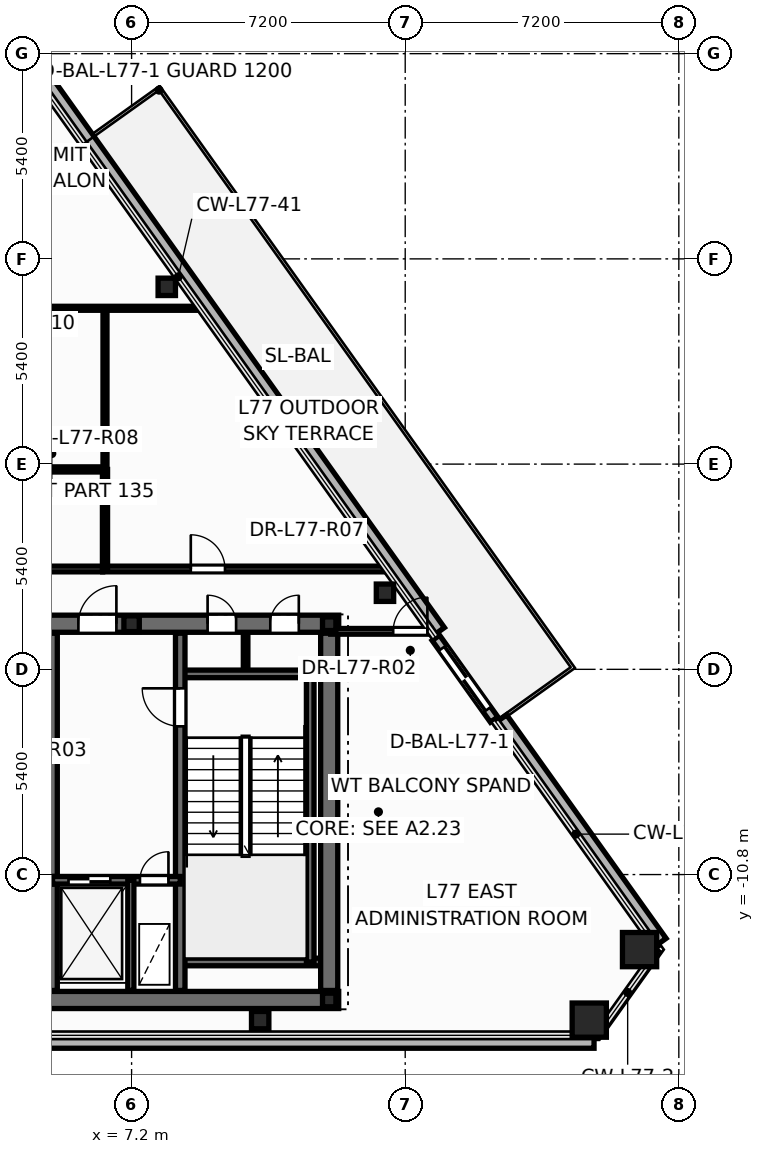
"""IFC4 building model, lengths in metres.
Left out: names, types, materials, properties, quantities, classifications, styles, units other than length and angle.
Written with IfcOpenShell. Run it as: python <this file> out.ifc"""

import sys

from ifc_helpers import new_model, si_unit, direction, frame, frame_2d, origin, origin_2d, place, context, subcontext, project, spatial, rectangle, hollow_rectangle, hollow_circle, i_section, extrude, element, fill, save


model = new_model("IFC4")
c1 = context("Model", 3, precision=1e-05, world=origin(), true_north=direction((0.0, 1.0)))
c2 = subcontext(c1, "Body", "Model", "MODEL_VIEW")
j1 = project(units=[si_unit("LENGTHUNIT", "METRE"), si_unit("PLANEANGLEUNIT", "RADIAN")], contexts=[c1])
p1 = place(None, origin())
s1 = spatial("IfcSite", under=j1, at=p1, CompositionType="ELEMENT")
p2 = place(p1, origin())
s2 = spatial("IfcBuilding", under=s1, at=p2, CompositionType="ELEMENT")
p3 = place(p2, frame((0.0, 0.0, 293.4)))
s3 = spatial("IfcBuildingStorey", under=s2, at=p3, CompositionType="ELEMENT", Elevation=293.4)
for number, where, z_axis, x_axis in (
    (1, (19.243, -14.63, 0.0), (0.0, 0.0, 1.0), (1.0, 0.0, 0.0)),
    (2, (20.567, -12.775, 0.0), (0.0, 0.0, 1.0), (1.0, 0.0, 0.0)),
):
    element("IfcColumn", number, at=place(p3, frame(where, z_axis=z_axis, x_axis=x_axis)), inside=s3, PredefinedType="COLUMN", context=c2, shape_type="SweptSolid", body=[
        extrude(hollow_rectangle(XDim=0.9, YDim=0.9, WallThickness=0.04, at=origin_2d()), origin(), (0.0, 0.0, 1.0), 4.2),
    ])
for number, where, z_axis, x_axis in (
    (3, (10.583, -14.63, 0.0), (0.0, 0.0, 1.0), (1.0, 0.0, 0.0)),
    (4, (13.868, -3.385, 0.0), (0.0, 0.0, 1.0), (1.0, 0.0, 0.0)),
    (5, (8.126, 4.664, 0.0), (0.0, 0.0, 1.0), (1.0, 0.0, 0.0)),
):
    element("IfcColumn", number, at=place(p3, frame(where, z_axis=z_axis, x_axis=x_axis)), inside=s3, PredefinedType="COLUMN", context=c2, shape_type="SweptSolid", body=[
        extrude(hollow_circle(Radius=0.229, WallThickness=0.016, at=origin_2d()), origin(), (0.0, 0.0, 1.0), 4.2),
    ])
for number, where, z_axis, x_axis in (
    (6, (12.4, -14.1, 0.0), (0.0, 0.0, 1.0), (1.0, 0.0, 0.0)),
    (7, (12.4, -4.2, 0.0), (0.0, 0.0, 1.0), (1.0, 0.0, 0.0)),
):
    element("IfcColumn", number, at=place(p3, frame(where, z_axis=z_axis, x_axis=x_axis)), inside=s3, PredefinedType="COLUMN", context=c2, shape_type="SweptSolid", body=[
        extrude(i_section(OverallWidth=0.352, OverallDepth=0.359, WebThickness=0.018, FlangeThickness=0.026, at=origin_2d()), origin(), (0.0, 0.0, 1.0), 4.2),
    ])
p4 = place(p3, frame((7.2, -4.2, 0.0), z_axis=(0.0, 0.0, 1.0), x_axis=(1.0, 0.0, 0.0)))
e8 = element("IfcColumn", 8, at=p4, inside=s3, PredefinedType="PILASTER", context=c2, shape_type="SweptSolid", body=[
    extrude(i_section(OverallWidth=0.405, OverallDepth=0.414, WebThickness=0.022, FlangeThickness=0.032, at=origin_2d()), origin(), (0.0, 0.0, 1.0), 4.2),
])
p5 = place(p3, frame((-19.369, -15.19, -0.2), z_axis=(0.0, 0.0, 1.0), x_axis=(1.0, 0.0, 0.0)))
e9 = element("IfcWall", 9, at=p5, inside=s3, PredefinedType="PARAPET", context=c2, shape_type="SweptSolid", body=[
    extrude(rectangle(XDim=38.738, YDim=0.36, at=frame_2d((19.369, 0.0))), origin(), (0.0, 0.0, 1.0), 0.38),
])
p6 = place(p3, frame((21.119, -12.584, -0.2), z_axis=(0.0, 0.0, 1.0), x_axis=(-0.580761854771, 0.81407350285, 0.0)))
e10 = element("IfcWall", 10, at=p6, inside=s3, PredefinedType="PARAPET", context=c2, shape_type="SweptSolid", body=[
    extrude(rectangle(XDim=7.226, YDim=0.36, at=frame_2d((3.613, 0.0))), origin(), (0.0, 0.0, 1.0), 0.38),
])
p7 = place(p3, frame((15.285, -4.406, -0.2), z_axis=(0.0, 0.0, 1.0), x_axis=(-0.580762496963, 0.814073044709, 0.0)))
e11 = element("IfcWall", 11, at=p7, inside=s3, PredefinedType="PARAPET", context=c2, shape_type="SweptSolid", body=[
    extrude(rectangle(XDim=23.163, YDim=0.36, at=frame_2d((11.581, 0.0))), origin(), (0.0, 0.0, 1.0), 0.38),
])
p8 = place(p3, frame((16.74, -6.722, -0.015), z_axis=(0.0, 0.0, 1.0), x_axis=(-0.580756960622, 0.814076994325, 0.0)))
e12 = element("IfcWall", 12, at=p8, inside=s3, PredefinedType="STANDARD", context=c2, shape_type="SweptSolid", body=[
    extrude(rectangle(XDim=2.64, YDim=0.24, at=frame_2d((1.32, 0.0))), origin(), (0.0, 0.0, 1.0), 3.413),
])
p9 = place(p8, frame((0.32, 0.0, 0.015)))
e13 = element("IfcOpeningElement", 13, at=p9, cuts=e12, PredefinedType="OPENING", context=c2, shape_type="SweptSolid", body=[
    extrude(rectangle(XDim=2.006, YDim=2.204, at=frame_2d((1.0, 1.102))), frame((0.0, 0.13, 0.0), z_axis=(0.0, -1.0, 0.0), x_axis=(1.0, 0.0, 0.0)), (0.0, 0.0, 1.0), 0.26),
])
p10 = place(p3, frame((2.06, -9.45, 0.0), z_axis=(0.0, 0.0, 1.0), x_axis=(1.0, 0.0, 0.0)))
e14 = element("IfcWall", 14, at=p10, inside=s3, PredefinedType="PARTITIONING", context=c2, shape_type="SweptSolid", body=[
    extrude(rectangle(XDim=3.06, YDim=0.15, at=frame_2d((1.53, 0.0))), origin(), (0.0, 0.0, 1.0), 3.88),
])
p11 = place(p3, frame((10.2, -5.52, 0.0), z_axis=(0.0, 0.0, 1.0), x_axis=(0.0, 1.0, 0.0)))
e15 = element("IfcWall", 15, at=p11, inside=s3, PredefinedType="PARTITIONING", context=c2, shape_type="SweptSolid", body=[
    extrude(rectangle(XDim=1.12, YDim=0.12, at=frame_2d((0.56, 0.0))), origin(), (0.0, 0.0, 1.0), 3.88),
])
p12 = place(p3, frame((-12.65, -14.1, 0.0), z_axis=(0.0, 0.0, 1.0), x_axis=(1.0, 0.0, 0.0)))
e16 = element("IfcWall", 16, at=p12, inside=s3, PredefinedType="SHEAR", context=c2, shape_type="SweptSolid", body=[
    extrude(rectangle(XDim=25.3, YDim=0.45, at=frame_2d((12.65, 0.0))), origin(), (0.0, 0.0, 1.0), 4.2),
])
p13 = place(p3, frame((-12.65, -4.2, 0.0), z_axis=(0.0, 0.0, 1.0), x_axis=(1.0, 0.0, 0.0)))
e17 = element("IfcWall", 17, at=p13, inside=s3, PredefinedType="SHEAR", context=c2, shape_type="SweptSolid", body=[
    extrude(rectangle(XDim=25.3, YDim=0.45, at=frame_2d((12.65, 0.0))), origin(), (0.0, 0.0, 1.0), 4.2),
])
p14 = place(p13, frame((0.95, 0.0, 0.0)))
e18 = element("IfcOpeningElement", 18, at=p14, cuts=e17, PredefinedType="OPENING", context=c2, shape_type="SweptSolid", body=[
    extrude(rectangle(XDim=0.756, YDim=2.054, at=frame_2d((0.375, 1.027))), frame((0.0, 0.235, 0.0), z_axis=(0.0, -1.0, 0.0), x_axis=(1.0, 0.0, 0.0)), (0.0, 0.0, 1.0), 0.47),
])
p15 = place(p13, frame((2.6, 0.0, 0.0)))
e19 = element("IfcOpeningElement", 19, at=p15, cuts=e17, PredefinedType="OPENING", context=c2, shape_type="SweptSolid", body=[
    extrude(rectangle(XDim=0.756, YDim=2.054, at=frame_2d((0.375, 1.027))), frame((0.0, 0.235, 0.0), z_axis=(0.0, -1.0, 0.0), x_axis=(1.0, 0.0, 0.0)), (0.0, 0.0, 1.0), 0.47),
])
p16 = place(p13, frame((21.85, 0.0, 0.0)))
e20 = element("IfcOpeningElement", 20, at=p16, cuts=e17, PredefinedType="OPENING", context=c2, shape_type="SweptSolid", body=[
    extrude(rectangle(XDim=0.756, YDim=2.054, at=frame_2d((0.375, 1.027))), frame((0.0, 0.235, 0.0), z_axis=(0.0, -1.0, 0.0), x_axis=(1.0, 0.0, 0.0)), (0.0, 0.0, 1.0), 0.47),
])
p17 = place(p13, frame((23.5, 0.0, 0.0)))
e21 = element("IfcOpeningElement", 21, at=p17, cuts=e17, PredefinedType="OPENING", context=c2, shape_type="SweptSolid", body=[
    extrude(rectangle(XDim=0.756, YDim=2.054, at=frame_2d((0.375, 1.027))), frame((0.0, 0.235, 0.0), z_axis=(0.0, -1.0, 0.0), x_axis=(1.0, 0.0, 0.0)), (0.0, 0.0, 1.0), 0.47),
])
p18 = place(p13, frame((5.85, 0.0, 0.0)))
e22 = element("IfcOpeningElement", 22, at=p18, cuts=e17, PredefinedType="OPENING", context=c2, shape_type="SweptSolid", body=[
    extrude(rectangle(XDim=1.006, YDim=2.104, at=frame_2d((0.5, 1.052))), frame((0.0, 0.235, 0.0), z_axis=(0.0, -1.0, 0.0), x_axis=(1.0, 0.0, 0.0)), (0.0, 0.0, 1.0), 0.47),
])
p19 = place(p13, frame((10.35, 0.0, 0.0)))
e23 = element("IfcOpeningElement", 23, at=p19, cuts=e17, PredefinedType="OPENING", context=c2, shape_type="SweptSolid", body=[
    extrude(rectangle(XDim=1.406, YDim=2.154, at=frame_2d((0.7, 1.077))), frame((0.0, 0.235, 0.0), z_axis=(0.0, -1.0, 0.0), x_axis=(1.0, 0.0, 0.0)), (0.0, 0.0, 1.0), 0.47),
])
p20 = place(p13, frame((18.45, 0.0, 0.0)))
e24 = element("IfcOpeningElement", 24, at=p20, cuts=e17, PredefinedType="OPENING", context=c2, shape_type="SweptSolid", body=[
    extrude(rectangle(XDim=1.006, YDim=2.104, at=frame_2d((0.5, 1.052))), frame((0.0, 0.235, 0.0), z_axis=(0.0, -1.0, 0.0), x_axis=(1.0, 0.0, 0.0)), (0.0, 0.0, 1.0), 0.47),
])
for number, where, z_axis, x_axis in (
    (25, (8.48, -5.52, 0.0), (0.0, 0.0, 1.0), (1.0, 0.0, 0.0)),
    (26, (8.48, -13.1, 0.0), (0.0, 0.0, 1.0), (1.0, 0.0, 0.0)),
):
    element("IfcWall", number, at=place(p3, frame(where, z_axis=z_axis, x_axis=x_axis)), inside=s3, PredefinedType="SOLIDWALL", context=c2, shape_type="SweptSolid", body=[
        extrude(rectangle(XDim=3.87, YDim=0.2, at=frame_2d((1.935, 0.0))), origin(), (0.0, 0.0, 1.0), 4.2),
    ])
p21 = place(p3, frame((11.9, -13.1, 0.0), z_axis=(0.0, 0.0, 1.0), x_axis=(0.0, 1.0, 0.0)))
e27 = element("IfcWall", 27, at=p21, inside=s3, PredefinedType="SOLIDWALL", context=c2, shape_type="SweptSolid", body=[
    extrude(rectangle(XDim=7.58, YDim=0.2, at=frame_2d((3.79, 0.0))), origin(), (0.0, 0.0, 1.0), 4.2),
])
p22 = place(p3, frame((8.48, -13.85, 0.0), z_axis=(0.0, 0.0, 1.0), x_axis=(0.0, 1.0, 0.0)))
e28 = element("IfcWall", 28, at=p22, inside=s3, PredefinedType="SHEAR", context=c2, shape_type="SweptSolid", body=[
    extrude(rectangle(XDim=9.4, YDim=0.25, at=frame_2d((4.7, 0.0))), origin(), (0.0, 0.0, 1.0), 4.2),
])
p23 = place(p22, frame((6.95, 0.0, 0.0)))
e29 = element("IfcOpeningElement", 29, at=p23, cuts=e28, PredefinedType="OPENING", context=c2, shape_type="SweptSolid", body=[
    extrude(rectangle(XDim=1.006, YDim=2.104, at=frame_2d((0.5, 1.052))), frame((0.0, 0.135, 0.0), z_axis=(0.0, -1.0, 0.0), x_axis=(1.0, 0.0, 0.0)), (0.0, 0.0, 1.0), 0.27),
])
p24 = place(p3, frame((5.12, -13.85, 0.0), z_axis=(0.0, 0.0, 1.0), x_axis=(0.0, 1.0, 0.0)))
e30 = element("IfcWall", 30, at=p24, inside=s3, PredefinedType="SHEAR", context=c2, shape_type="SweptSolid", body=[
    extrude(rectangle(XDim=9.4, YDim=0.25, at=frame_2d((4.7, 0.0))), origin(), (0.0, 0.0, 1.0), 4.2),
])
p25 = place(p3, frame((-5.12, -10.95, 0.0), z_axis=(0.0, 0.0, 1.0), x_axis=(1.0, 0.0, 0.0)))
e31 = element("IfcWall", 31, at=p25, inside=s3, PredefinedType="SOLIDWALL", context=c2, shape_type="SweptSolid", body=[
    extrude(rectangle(XDim=10.24, YDim=0.2, at=frame_2d((5.12, 0.0))), origin(), (0.0, 0.0, 1.0), 4.2),
])
p26 = place(p25, frame((0.6, 0.0, 0.0)))
e32 = element("IfcOpeningElement", 32, at=p26, cuts=e31, PredefinedType="OPENING", context=c2, shape_type="SweptSolid", body=[
    extrude(rectangle(XDim=1.106, YDim=2.104, at=frame_2d((0.55, 1.052))), frame((0.0, 0.11, 0.0), z_axis=(0.0, -1.0, 0.0), x_axis=(1.0, 0.0, 0.0)), (0.0, 0.0, 1.0), 0.22),
])
p27 = place(p25, frame((4.65, 0.0, 0.0)))
e33 = element("IfcOpeningElement", 33, at=p27, cuts=e31, PredefinedType="OPENING", context=c2, shape_type="SweptSolid", body=[
    extrude(rectangle(XDim=0.956, YDim=2.104, at=frame_2d((0.475, 1.052))), frame((0.0, 0.11, 0.0), z_axis=(0.0, -1.0, 0.0), x_axis=(1.0, 0.0, 0.0)), (0.0, 0.0, 1.0), 0.22),
])
p28 = place(p25, frame((8.54, 0.0, 0.0)))
e34 = element("IfcOpeningElement", 34, at=p28, cuts=e31, PredefinedType="OPENING", context=c2, shape_type="SweptSolid", body=[
    extrude(rectangle(XDim=1.106, YDim=2.104, at=frame_2d((0.55, 1.052))), frame((0.0, 0.11, 0.0), z_axis=(0.0, -1.0, 0.0), x_axis=(1.0, 0.0, 0.0)), (0.0, 0.0, 1.0), 0.22),
])
p29 = place(p3, frame((5.12, -10.95, 0.0), z_axis=(0.0, 0.0, 1.0), x_axis=(1.0, 0.0, 0.0)))
e35 = element("IfcWall", 35, at=p29, inside=s3, PredefinedType="SOLIDWALL", context=c2, shape_type="SweptSolid", body=[
    extrude(rectangle(XDim=3.36, YDim=0.2, at=frame_2d((1.68, 0.0))), origin(), (0.0, 0.0, 1.0), 4.2),
])
p30 = place(p29, frame((0.42, 0.0, 0.0)))
e36 = element("IfcOpeningElement", 36, at=p30, cuts=e35, PredefinedType="OPENING", context=c2, shape_type="SweptSolid", body=[
    extrude(rectangle(XDim=1.106, YDim=2.104, at=frame_2d((0.55, 1.052))), frame((0.0, 0.11, 0.0), z_axis=(0.0, -1.0, 0.0), x_axis=(1.0, 0.0, 0.0)), (0.0, 0.0, 1.0), 0.22),
])
p31 = place(p29, frame((2.3, 0.0, 0.0)))
e37 = element("IfcOpeningElement", 37, at=p31, cuts=e35, PredefinedType="OPENING", context=c2, shape_type="SweptSolid", body=[
    extrude(rectangle(XDim=0.756, YDim=2.054, at=frame_2d((0.375, 1.027))), frame((0.0, 0.11, 0.0), z_axis=(0.0, -1.0, 0.0), x_axis=(1.0, 0.0, 0.0)), (0.0, 0.0, 1.0), 0.22),
])
p32 = place(p3, frame((7.18, -13.85, 0.0), z_axis=(0.0, 0.0, 1.0), x_axis=(0.0, 1.0, 0.0)))
e38 = element("IfcWall", 38, at=p32, inside=s3, PredefinedType="PARTITIONING", context=c2, shape_type="SweptSolid", body=[
    extrude(rectangle(XDim=2.9, YDim=0.16, at=frame_2d((1.45, 0.0))), origin(), (0.0, 0.0, 1.0), 3.105),
])
p33 = place(p3, frame((12.4, -13.85, 0.0), z_axis=(0.0, 0.0, 1.0), x_axis=(0.0, 1.0, 0.0)))
e39 = element("IfcWall", 39, at=p33, inside=s3, PredefinedType="SHEAR", context=c2, shape_type="SweptSolid", body=[
    extrude(rectangle(XDim=9.4, YDim=0.45, at=frame_2d((4.7, 0.0))), origin(), (0.0, 0.0, 1.0), 4.2),
])
p34 = place(p3, frame((6.44, -2.76, 0.0), z_axis=(0.0, 0.0, 1.0), x_axis=(1.0, 0.0, 0.0)))
e40 = element("IfcWall", 40, at=p34, inside=s3, PredefinedType="PARTITIONING", context=c2, shape_type="SweptSolid", body=[
    extrude(rectangle(XDim=7.474, YDim=0.15, at=frame_2d((3.737, 0.0))), origin(), (0.0, 0.0, 1.0), 2.855),
])
p35 = place(p34, frame((2.318, 0.0, 0.0)))
e41 = element("IfcOpeningElement", 41, at=p35, cuts=e40, PredefinedType="OPENING", context=c2, shape_type="SweptSolid", body=[
    extrude(rectangle(XDim=0.906, YDim=2.104, at=frame_2d((0.45, 1.052))), frame((0.0, 0.085, 0.0), z_axis=(0.0, -1.0, 0.0), x_axis=(1.0, 0.0, 0.0)), (0.0, 0.0, 1.0), 0.17),
])
p36 = place(p3, frame((6.5, -0.2, 0.0), z_axis=(0.0, 0.0, 1.0), x_axis=(0.0, 1.0, 0.0)))
e42 = element("IfcWall", 42, at=p36, inside=s3, PredefinedType="PARTITIONING", context=c2, shape_type="SweptSolid", body=[
    extrude(rectangle(XDim=4.3, YDim=0.105, at=frame_2d((2.15, 0.0))), origin(), (0.0, 0.0, 1.0), 2.855),
])
p37 = place(p3, frame((3.7, -2.76, 0.0), z_axis=(0.0, 0.0, 1.0), x_axis=(1.0, 0.0, 0.0)))
e43 = element("IfcWall", 43, at=p37, inside=s3, PredefinedType="PARTITIONING", context=c2, shape_type="SweptSolid", body=[
    extrude(rectangle(XDim=2.738, YDim=0.15, at=frame_2d((1.369, 0.0))), origin(), (0.0, 0.0, 1.0), 3.88),
])
p38 = place(p37, frame((0.36, 0.0, 0.0)))
e44 = element("IfcOpeningElement", 44, at=p38, cuts=e43, PredefinedType="OPENING", context=c2, shape_type="SweptSolid", body=[
    extrude(rectangle(XDim=0.906, YDim=2.104, at=frame_2d((0.45, 1.052))), frame((0.0, 0.085, 0.0), z_axis=(0.0, -1.0, 0.0), x_axis=(1.0, 0.0, 0.0)), (0.0, 0.0, 1.0), 0.17),
])
p39 = place(p3, frame((3.7, -0.14, 0.0), z_axis=(0.0, 0.0, 1.0), x_axis=(1.0, 0.0, 0.0)))
e45 = element("IfcWall", 45, at=p39, inside=s3, PredefinedType="PARTITIONING", context=c2, shape_type="SweptSolid", body=[
    extrude(rectangle(XDim=2.8, YDim=0.135, at=frame_2d((1.4, 0.0))), origin(), (0.0, 0.0, 1.0), 2.855),
])
p40 = place(p3, frame((3.7, 4.1, 0.0), z_axis=(0.0, 0.0, 1.0), x_axis=(1.0, 0.0, 0.0)))
e46 = element("IfcWall", 46, at=p40, inside=s3, PredefinedType="PARTITIONING", context=c2, shape_type="SweptSolid", body=[
    extrude(rectangle(XDim=5.32, YDim=0.105, at=frame_2d((2.66, 0.0))), origin(), (0.0, 0.0, 1.0), 2.855),
])
p41 = place(p3, frame((12.44, -4.4, 0.0), z_axis=(0.0, 0.0, 1.0), x_axis=(1.0, 0.0, 0.0)))
e47 = element("IfcWall", 47, at=p41, inside=s3, PredefinedType="PARTITIONING", context=c2, shape_type="SweptSolid", body=[
    extrude(rectangle(XDim=2.644, YDim=0.15, at=frame_2d((1.322, 0.0))), origin(), (0.0, 0.0, 1.0), 2.855),
])
p42 = place(p41, frame((1.644, 0.0, 0.0)))
e48 = element("IfcOpeningElement", 48, at=p42, cuts=e47, PredefinedType="OPENING", context=c2, shape_type="SweptSolid", body=[
    extrude(rectangle(XDim=0.906, YDim=2.104, at=frame_2d((0.45, 1.052))), frame((0.0, 0.085, 0.0), z_axis=(0.0, -1.0, 0.0), x_axis=(1.0, 0.0, 0.0)), (0.0, 0.0, 1.0), 0.17),
])
p43 = place(p3, frame((6.5, -2.76, 0.0), z_axis=(0.0, 0.0, 1.0), x_axis=(0.0, 1.0, 0.0)))
e49 = element("IfcWall", 49, at=p43, inside=s3, PredefinedType="PARTITIONING", context=c2, shape_type="SweptSolid", body=[
    extrude(rectangle(XDim=2.62, YDim=0.135, at=frame_2d((1.31, 0.0))), origin(), (0.0, 0.0, 1.0), 2.855),
])
p44 = place(p9, origin())
e50 = element("IfcDoor", 50, at=p44, inside=s3, OperationType="DOUBLE_DOOR_SLIDING", PredefinedType="DOOR", context=c2, shape_type="SweptSolid", body=[
    extrude(rectangle(XDim=2.0, YDim=2.2, at=frame_2d((1.0, 1.1))), frame((0.0, 0.025, 0.0), z_axis=(0.0, -1.0, 0.0), x_axis=(1.0, 0.0, 0.0)), (0.0, 0.0, 1.0), 0.05),
])
fill(e13, e50)
p45 = place(p23, origin())
e51 = element("IfcDoor", 51, at=p45, inside=s3, OperationType="SINGLE_SWING_RIGHT", PredefinedType="DOOR", context=c2, shape_type="SweptSolid", body=[
    extrude(rectangle(XDim=1.0, YDim=2.1, at=frame_2d((0.5, 1.05))), frame((0.0, 0.025, 0.0), z_axis=(0.0, -1.0, 0.0), x_axis=(1.0, 0.0, 0.0)), (0.0, 0.0, 1.0), 0.05),
])
fill(e29, e51)
p46 = place(p30, origin())
e52 = element("IfcDoor", 52, at=p46, inside=s3, OperationType="DOUBLE_DOOR_SLIDING", PredefinedType="DOOR", context=c2, shape_type="SweptSolid", body=[
    extrude(rectangle(XDim=1.1, YDim=2.1, at=frame_2d((0.55, 1.05))), frame((0.0, 0.025, 0.0), z_axis=(0.0, -1.0, 0.0), x_axis=(1.0, 0.0, 0.0)), (0.0, 0.0, 1.0), 0.05),
])
fill(e36, e52)
p47 = place(p31, origin())
e53 = element("IfcDoor", 53, at=p47, inside=s3, OperationType="SINGLE_SWING_RIGHT", PredefinedType="DOOR", context=c2, shape_type="SweptSolid", body=[
    extrude(rectangle(XDim=0.75, YDim=2.05, at=frame_2d((0.375, 1.025))), frame((0.0, 0.025, 0.0), z_axis=(0.0, -1.0, 0.0), x_axis=(1.0, 0.0, 0.0)), (0.0, 0.0, 1.0), 0.05),
])
fill(e37, e53)
p48 = place(p16, origin())
e54 = element("IfcDoor", 54, at=p48, inside=s3, OperationType="SINGLE_SWING_LEFT", PredefinedType="DOOR", context=c2, shape_type="SweptSolid", body=[
    extrude(rectangle(XDim=0.75, YDim=2.05, at=frame_2d((0.375, 1.025))), frame((0.0, 0.025, 0.0), z_axis=(0.0, -1.0, 0.0), x_axis=(1.0, 0.0, 0.0)), (0.0, 0.0, 1.0), 0.05),
])
fill(e20, e54)
p49 = place(p17, origin())
e55 = element("IfcDoor", 55, at=p49, inside=s3, OperationType="SINGLE_SWING_RIGHT", PredefinedType="DOOR", context=c2, shape_type="SweptSolid", body=[
    extrude(rectangle(XDim=0.75, YDim=2.05, at=frame_2d((0.375, 1.025))), frame((0.0, 0.025, 0.0), z_axis=(0.0, -1.0, 0.0), x_axis=(1.0, 0.0, 0.0)), (0.0, 0.0, 1.0), 0.05),
])
fill(e21, e55)
p50 = place(p20, origin())
e56 = element("IfcDoor", 56, at=p50, inside=s3, OperationType="SINGLE_SWING_RIGHT", PredefinedType="DOOR", context=c2, shape_type="SweptSolid", body=[
    extrude(rectangle(XDim=1.0, YDim=2.1, at=frame_2d((0.5, 1.05))), frame((0.0, 0.025, 0.0), z_axis=(0.0, -1.0, 0.0), x_axis=(1.0, 0.0, 0.0)), (0.0, 0.0, 1.0), 0.05),
])
fill(e24, e56)
p51 = place(p42, origin())
e57 = element("IfcDoor", 57, at=p51, inside=s3, OperationType="SINGLE_SWING_RIGHT", PredefinedType="DOOR", context=c2, shape_type="SweptSolid", body=[
    extrude(rectangle(XDim=0.9, YDim=2.1, at=frame_2d((0.45, 1.05))), frame((0.0, 0.025, 0.0), z_axis=(0.0, -1.0, 0.0), x_axis=(1.0, 0.0, 0.0)), (0.0, 0.0, 1.0), 0.05),
])
fill(e48, e57)
p52 = place(p35, origin())
e58 = element("IfcDoor", 58, at=p52, inside=s3, OperationType="SINGLE_SWING_LEFT", PredefinedType="DOOR", context=c2, shape_type="SweptSolid", body=[
    extrude(rectangle(XDim=0.9, YDim=2.1, at=frame_2d((0.45, 1.05))), frame((0.0, 0.025, 0.0), z_axis=(0.0, -1.0, 0.0), x_axis=(1.0, 0.0, 0.0)), (0.0, 0.0, 1.0), 0.05),
])
fill(e41, e58)
save(model, sys.argv[1])
